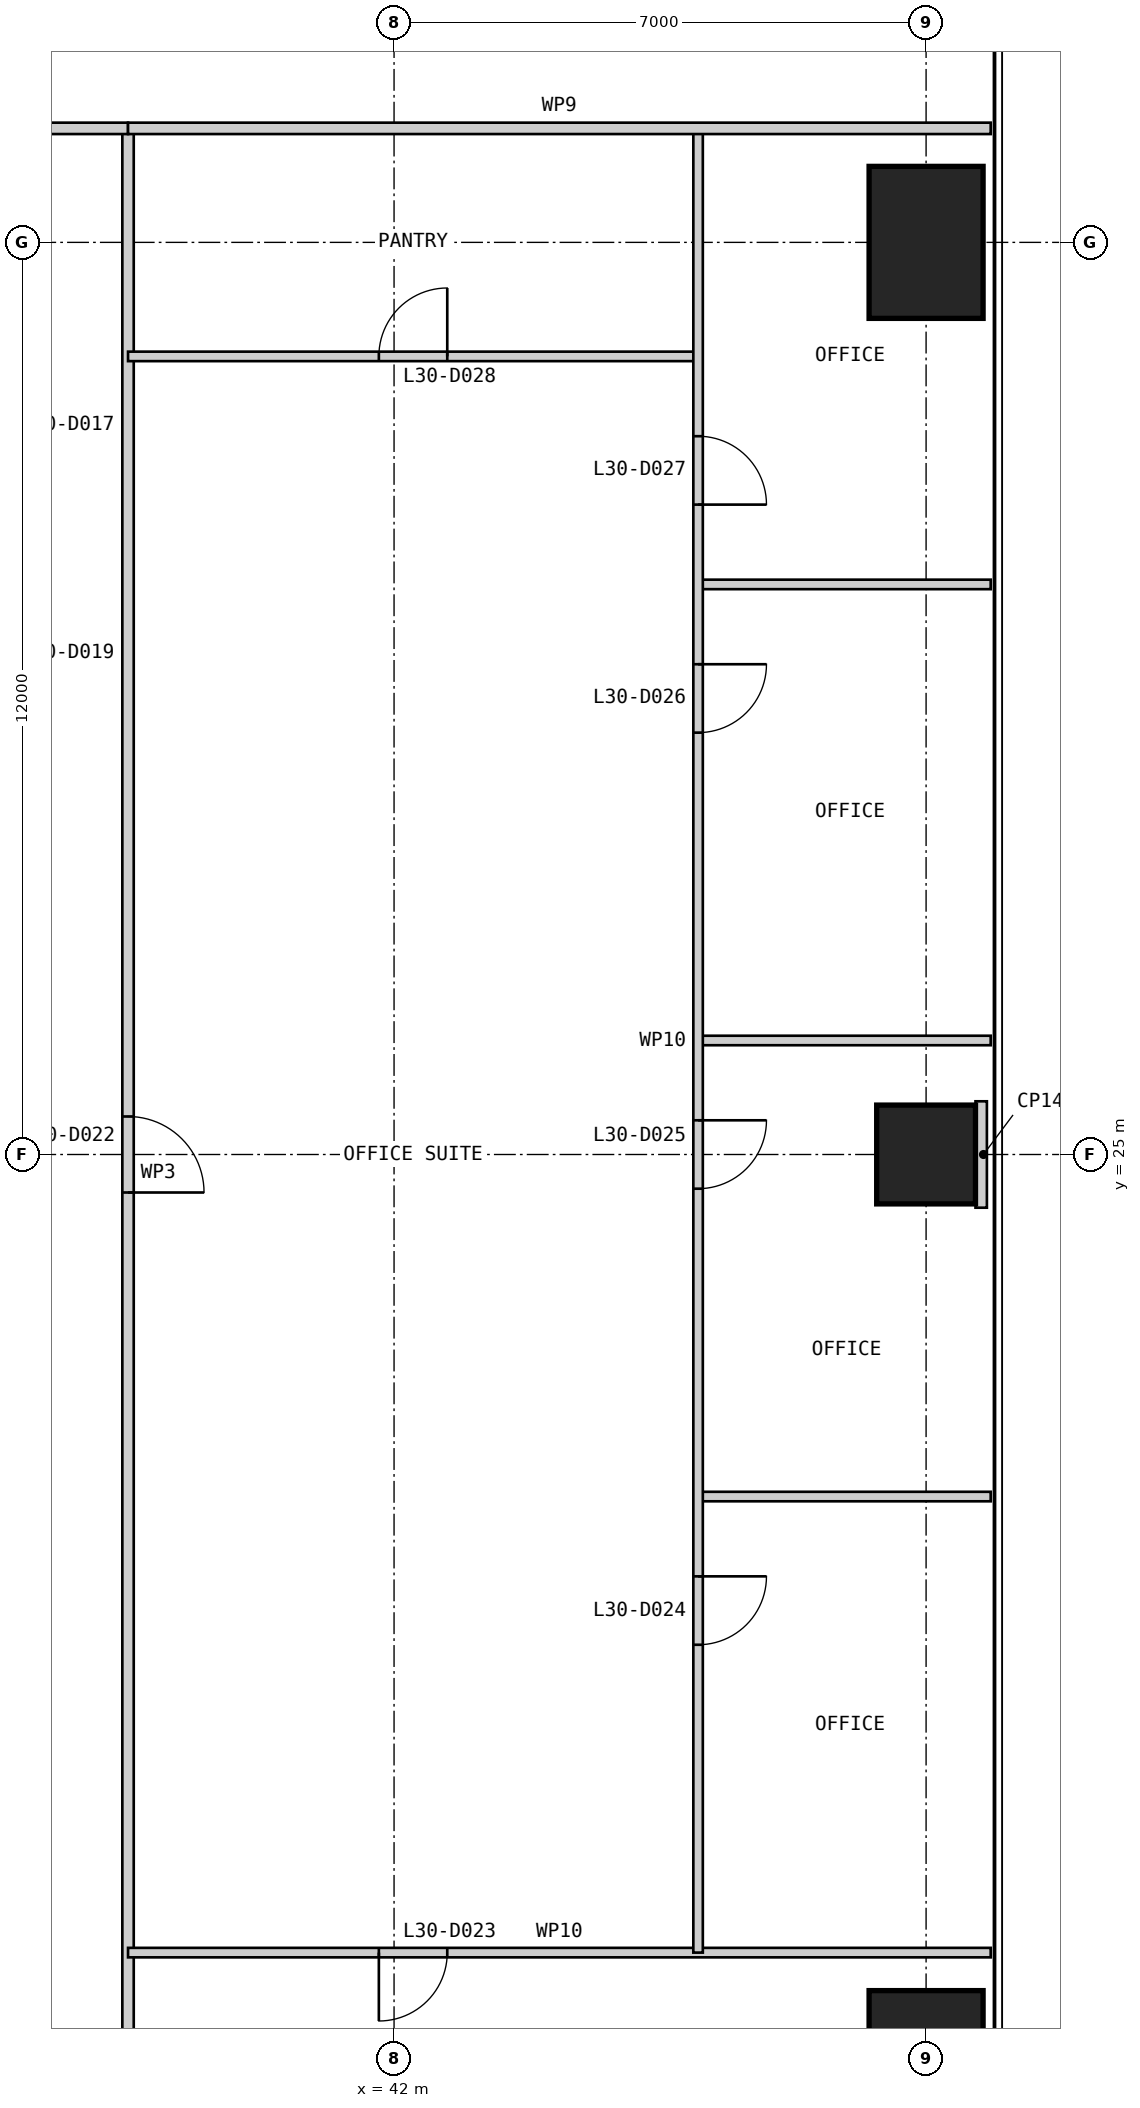
"""IFC4 building model, lengths in metres.
Left out: names, types, materials, properties, quantities, classifications, styles, units other than length and angle.
Written with IfcOpenShell. Run it as: python <this file> out.ifc"""

import sys

from ifc_helpers import new_model, si_unit, direction, frame, frame_2d, origin, origin_2d, place, context, subcontext, project, spatial, rectangle, extrude, element, fill, save


model = new_model("IFC4")
c1 = context("Model", 3, precision=1e-05, world=origin(), true_north=direction((0.0, 1.0)))
c2 = subcontext(c1, "Body", "Model", "MODEL_VIEW")
j1 = project(units=[si_unit("LENGTHUNIT", "METRE"), si_unit("PLANEANGLEUNIT", "RADIAN")], contexts=[c1])
p1 = place(None, origin())
s1 = spatial("IfcSite", under=j1, at=p1, CompositionType="ELEMENT")
p2 = place(p1, origin())
s2 = spatial("IfcBuilding", under=s1, at=p2, CompositionType="ELEMENT")
p3 = place(p2, frame((0.0, 0.0, 130.4)))
s3 = spatial("IfcBuildingStorey", under=s2, at=p3, CompositionType="ELEMENT", Elevation=130.4)
p4 = place(p3, frame((49.0, 13.0, 0.0), z_axis=(0.0, 0.0, 1.0), x_axis=(1.0, 0.0, 0.0)))
e1 = element("IfcColumn", 1, at=p4, inside=s3, PredefinedType="COLUMN", context=c2, shape_type="SweptSolid", body=[
    extrude(rectangle(XDim=1.5, YDim=2.0, at=origin_2d()), origin(), (0.0, 0.0, 1.0), 4.0),
])
p5 = place(p3, frame((49.0, 25.0, 0.0), z_axis=(0.0, 0.0, 1.0), x_axis=(1.0, 0.0, 0.0)))
e2 = element("IfcColumn", 2, at=p5, inside=s3, PredefinedType="COLUMN", context=c2, shape_type="SweptSolid", body=[
    extrude(rectangle(XDim=1.3, YDim=1.3, at=origin_2d()), origin(), (0.0, 0.0, 1.0), 4.0),
])
p6 = place(p3, frame((49.0, 37.0, 0.0), z_axis=(0.0, 0.0, 1.0), x_axis=(1.0, 0.0, 0.0)))
e3 = element("IfcColumn", 3, at=p6, inside=s3, PredefinedType="COLUMN", context=c2, shape_type="SweptSolid", body=[
    extrude(rectangle(XDim=1.5, YDim=2.0, at=origin_2d()), origin(), (0.0, 0.0, 1.0), 4.0),
])
p7 = place(p3, frame((38.5, 11.5, 0.0), z_axis=(0.0, 0.0, 1.0), x_axis=(0.0, 1.0, 0.0)))
e4 = element("IfcWall", 4, at=p7, inside=s3, PredefinedType="PARTITIONING", context=c2, shape_type="SweptSolid", body=[
    extrude(rectangle(XDim=27.0, YDim=0.15, at=frame_2d((13.5, 0.0))), origin(), (0.0, 0.0, 1.0), 3.85),
])
p8 = place(p7, frame((13.0, 0.0, 0.0)))
e5 = element("IfcOpeningElement", 5, at=p8, cuts=e4, PredefinedType="OPENING", context=c2, shape_type="SweptSolid", body=[
    extrude(rectangle(XDim=1.0, YDim=2.2, at=frame_2d((0.5, 1.1))), frame((0.0, 0.085, 0.0), z_axis=(0.0, -1.0, 0.0), x_axis=(1.0, 0.0, 0.0)), (0.0, 0.0, 1.0), 0.17),
])
p9 = place(p3, frame((49.85, 14.5, 0.0), z_axis=(0.0, 0.0, 1.0), x_axis=(-1.0, 0.0, 0.0)))
e6 = element("IfcWall", 6, at=p9, inside=s3, PredefinedType="PARTITIONING", context=c2, shape_type="SweptSolid", body=[
    extrude(rectangle(XDim=11.35, YDim=0.125, at=frame_2d((5.675, 0.0))), origin(), (0.0, 0.0, 1.0), 3.85),
])
p10 = place(p9, frame((7.15, 0.0, 0.0)))
e7 = element("IfcOpeningElement", 7, at=p10, cuts=e6, PredefinedType="OPENING", context=c2, shape_type="SweptSolid", body=[
    extrude(rectangle(XDim=0.9, YDim=2.2, at=frame_2d((0.45, 1.1))), frame((0.0, 0.073, 0.0), z_axis=(0.0, -1.0, 0.0), x_axis=(1.0, 0.0, 0.0)), (0.0, 0.0, 1.0), 0.145),
])
for number, where, z_axis, x_axis in (
    (8, (49.85, 20.5, 0.0), (0.0, 0.0, 1.0), (-1.0, 0.0, 0.0)),
    (9, (49.85, 26.5, 0.0), (0.0, 0.0, 1.0), (-1.0, 0.0, 0.0)),
    (10, (49.85, 32.5, 0.0), (0.0, 0.0, 1.0), (-1.0, 0.0, 0.0)),
):
    element("IfcWall", number, at=place(p3, frame(where, z_axis=z_axis, x_axis=x_axis)), inside=s3, PredefinedType="PARTITIONING", context=c2, shape_type="SweptSolid", body=[
        extrude(rectangle(XDim=3.85, YDim=0.125, at=frame_2d((1.925, 0.0))), origin(), (0.0, 0.0, 1.0), 3.85),
    ])
p11 = place(p3, frame((46.0, 35.5, 0.0), z_axis=(0.0, 0.0, 1.0), x_axis=(-1.0, 0.0, 0.0)))
e11 = element("IfcWall", 11, at=p11, inside=s3, PredefinedType="PARTITIONING", context=c2, shape_type="SweptSolid", body=[
    extrude(rectangle(XDim=7.5, YDim=0.125, at=frame_2d((3.75, 0.0))), origin(), (0.0, 0.0, 1.0), 3.85),
])
p12 = place(p11, frame((3.3, 0.0, 0.0)))
e12 = element("IfcOpeningElement", 12, at=p12, cuts=e11, PredefinedType="OPENING", context=c2, shape_type="SweptSolid", body=[
    extrude(rectangle(XDim=0.9, YDim=2.2, at=frame_2d((0.45, 1.1))), frame((0.0, 0.073, 0.0), z_axis=(0.0, -1.0, 0.0), x_axis=(1.0, 0.0, 0.0)), (0.0, 0.0, 1.0), 0.145),
])
p13 = place(p3, frame((46.0, 14.5, 0.0), z_axis=(0.0, 0.0, 1.0), x_axis=(0.0, 1.0, 0.0)))
e13 = element("IfcWall", 13, at=p13, inside=s3, PredefinedType="PARTITIONING", context=c2, shape_type="SweptSolid", body=[
    extrude(rectangle(XDim=24.0, YDim=0.125, at=frame_2d((12.0, 0.0))), origin(), (0.0, 0.0, 1.0), 3.238),
])
p14 = place(p13, frame((4.05, 0.0, 0.0)))
e14 = element("IfcOpeningElement", 14, at=p14, cuts=e13, PredefinedType="OPENING", context=c2, shape_type="SweptSolid", body=[
    extrude(rectangle(XDim=0.9, YDim=2.2, at=frame_2d((0.45, 1.1))), frame((0.0, 0.073, 0.0), z_axis=(0.0, -1.0, 0.0), x_axis=(1.0, 0.0, 0.0)), (0.0, 0.0, 1.0), 0.145),
])
p15 = place(p13, frame((10.05, 0.0, 0.0)))
e15 = element("IfcOpeningElement", 15, at=p15, cuts=e13, PredefinedType="OPENING", context=c2, shape_type="SweptSolid", body=[
    extrude(rectangle(XDim=0.9, YDim=2.2, at=frame_2d((0.45, 1.1))), frame((0.0, 0.073, 0.0), z_axis=(0.0, -1.0, 0.0), x_axis=(1.0, 0.0, 0.0)), (0.0, 0.0, 1.0), 0.145),
])
p16 = place(p13, frame((16.05, 0.0, 0.0)))
e16 = element("IfcOpeningElement", 16, at=p16, cuts=e13, PredefinedType="OPENING", context=c2, shape_type="SweptSolid", body=[
    extrude(rectangle(XDim=0.9, YDim=2.2, at=frame_2d((0.45, 1.1))), frame((0.0, 0.073, 0.0), z_axis=(0.0, -1.0, 0.0), x_axis=(1.0, 0.0, 0.0)), (0.0, 0.0, 1.0), 0.145),
])
p17 = place(p13, frame((19.05, 0.0, 0.0)))
e17 = element("IfcOpeningElement", 17, at=p17, cuts=e13, PredefinedType="OPENING", context=c2, shape_type="SweptSolid", body=[
    extrude(rectangle(XDim=0.9, YDim=2.2, at=frame_2d((0.45, 1.1))), frame((0.0, 0.073, 0.0), z_axis=(0.0, -1.0, 0.0), x_axis=(1.0, 0.0, 0.0)), (0.0, 0.0, 1.0), 0.145),
])
p18 = place(p3, frame((38.5, 38.5, 0.0), z_axis=(0.0, 0.0, 1.0), x_axis=(-1.0, 0.0, 0.0)))
e18 = element("IfcWall", 18, at=p18, inside=s3, PredefinedType="PARTITIONING", context=c2, shape_type="SweptSolid", body=[
    extrude(rectangle(XDim=27.0, YDim=0.15, at=frame_2d((13.5, 0.0))), origin(), (0.0, 0.0, 1.0), 3.85),
])
p19 = place(p18, frame((11.5, 0.0, 0.0)))
e19 = element("IfcOpeningElement", 19, at=p19, cuts=e18, PredefinedType="OPENING", context=c2, shape_type="SweptSolid", body=[
    extrude(rectangle(XDim=1.0, YDim=2.2, at=frame_2d((0.5, 1.1))), frame((0.0, 0.085, 0.0), z_axis=(0.0, -1.0, 0.0), x_axis=(1.0, 0.0, 0.0)), (0.0, 0.0, 1.0), 0.17),
])
p20 = place(p3, frame((49.85, 38.5, 0.0), z_axis=(0.0, 0.0, 1.0), x_axis=(-1.0, 0.0, 0.0)))
e20 = element("IfcWall", 20, at=p20, inside=s3, PredefinedType="PARTITIONING", context=c2, shape_type="SweptSolid", body=[
    extrude(rectangle(XDim=11.35, YDim=0.15, at=frame_2d((5.675, 0.0))), origin(), (0.0, 0.0, 1.0), 3.85),
])
p21 = place(p3, frame((49.8, 25.0, 0.0), z_axis=(0.0, 0.0, 1.0), x_axis=(-1.0, 0.0, 0.0)))
e21 = element("IfcWall", 21, at=p21, inside=s3, PredefinedType="PARTITIONING", context=c2, shape_type="SweptSolid", body=[
    extrude(rectangle(XDim=0.15, YDim=1.4, at=frame_2d((0.075, 0.0))), origin(), (0.0, 0.0, 1.0), 3.85),
])
p22 = place(p8, frame((1.0, 0.0, 0.0), z_axis=(0.0, 0.0, 1.0), x_axis=(-1.0, 0.0, 0.0)))
e22 = element("IfcDoor", 22, at=p22, inside=s3, OperationType="SINGLE_SWING_RIGHT", PredefinedType="DOOR", context=c2, shape_type="SweptSolid", body=[
    extrude(rectangle(XDim=1.0, YDim=2.2, at=frame_2d((0.5, 1.1))), frame((0.0, 0.025, 0.0), z_axis=(0.0, -1.0, 0.0), x_axis=(1.0, 0.0, 0.0)), (0.0, 0.0, 1.0), 0.05),
])
fill(e5, e22)
p23 = place(p10, origin())
e23 = element("IfcDoor", 23, at=p23, inside=s3, OperationType="SINGLE_SWING_RIGHT", PredefinedType="DOOR", context=c2, shape_type="SweptSolid", body=[
    extrude(rectangle(XDim=0.9, YDim=2.2, at=frame_2d((0.45, 1.1))), frame((0.0, 0.025, 0.0), z_axis=(0.0, -1.0, 0.0), x_axis=(1.0, 0.0, 0.0)), (0.0, 0.0, 1.0), 0.05),
])
fill(e7, e23)
p24 = place(p14, frame((0.9, 0.0, 0.0), z_axis=(0.0, 0.0, 1.0), x_axis=(-1.0, 0.0, 0.0)))
e24 = element("IfcDoor", 24, at=p24, inside=s3, OperationType="SINGLE_SWING_LEFT", PredefinedType="DOOR", context=c2, shape_type="SweptSolid", body=[
    extrude(rectangle(XDim=0.9, YDim=2.2, at=frame_2d((0.45, 1.1))), frame((0.0, 0.025, 0.0), z_axis=(0.0, -1.0, 0.0), x_axis=(1.0, 0.0, 0.0)), (0.0, 0.0, 1.0), 0.05),
])
fill(e14, e24)
p25 = place(p15, frame((0.9, 0.0, 0.0), z_axis=(0.0, 0.0, 1.0), x_axis=(-1.0, 0.0, 0.0)))
e25 = element("IfcDoor", 25, at=p25, inside=s3, OperationType="SINGLE_SWING_LEFT", PredefinedType="DOOR", context=c2, shape_type="SweptSolid", body=[
    extrude(rectangle(XDim=0.9, YDim=2.2, at=frame_2d((0.45, 1.1))), frame((0.0, 0.025, 0.0), z_axis=(0.0, -1.0, 0.0), x_axis=(1.0, 0.0, 0.0)), (0.0, 0.0, 1.0), 0.05),
])
fill(e15, e25)
p26 = place(p16, frame((0.9, 0.0, 0.0), z_axis=(0.0, 0.0, 1.0), x_axis=(-1.0, 0.0, 0.0)))
e26 = element("IfcDoor", 26, at=p26, inside=s3, OperationType="SINGLE_SWING_LEFT", PredefinedType="DOOR", context=c2, shape_type="SweptSolid", body=[
    extrude(rectangle(XDim=0.9, YDim=2.2, at=frame_2d((0.45, 1.1))), frame((0.0, 0.025, 0.0), z_axis=(0.0, -1.0, 0.0), x_axis=(1.0, 0.0, 0.0)), (0.0, 0.0, 1.0), 0.05),
])
fill(e16, e26)
p27 = place(p17, frame((0.9, 0.0, 0.0), z_axis=(0.0, 0.0, 1.0), x_axis=(-1.0, 0.0, 0.0)))
e27 = element("IfcDoor", 27, at=p27, inside=s3, OperationType="SINGLE_SWING_RIGHT", PredefinedType="DOOR", context=c2, shape_type="SweptSolid", body=[
    extrude(rectangle(XDim=0.9, YDim=2.2, at=frame_2d((0.45, 1.1))), frame((0.0, 0.025, 0.0), z_axis=(0.0, -1.0, 0.0), x_axis=(1.0, 0.0, 0.0)), (0.0, 0.0, 1.0), 0.05),
])
fill(e17, e27)
p28 = place(p12, frame((0.9, 0.0, 0.0), z_axis=(0.0, 0.0, 1.0), x_axis=(-1.0, 0.0, 0.0)))
e28 = element("IfcDoor", 28, at=p28, inside=s3, OperationType="SINGLE_SWING_RIGHT", PredefinedType="DOOR", context=c2, shape_type="SweptSolid", body=[
    extrude(rectangle(XDim=0.9, YDim=2.2, at=frame_2d((0.45, 1.1))), frame((0.0, 0.025, 0.0), z_axis=(0.0, -1.0, 0.0), x_axis=(1.0, 0.0, 0.0)), (0.0, 0.0, 1.0), 0.05),
])
fill(e12, e28)
save(model, sys.argv[1])
